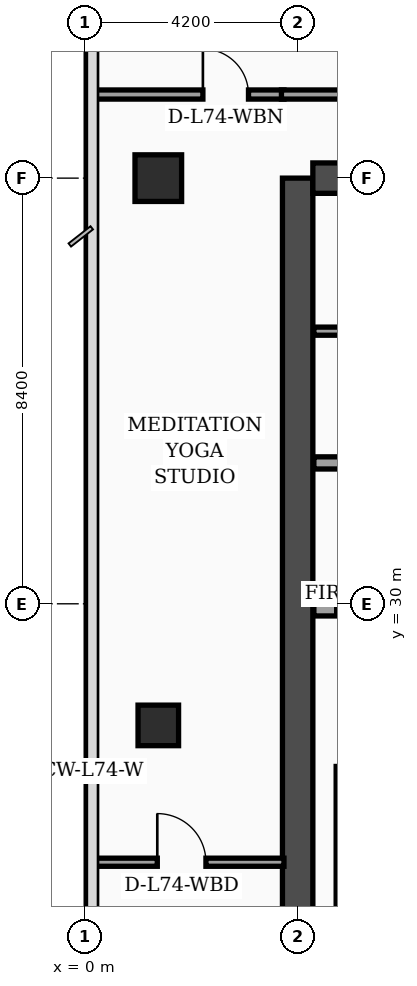
"""IFC4 building model, lengths in metres.
Left out: names, types, materials, properties, quantities, classifications, styles, units other than length and angle.
Written with IfcOpenShell. Run it as: python <this file> out.ifc"""

import sys

from ifc_helpers import new_model, si_unit, direction, frame, frame_2d, origin, origin_2d, place, context, subcontext, project, spatial, rectangle, extrude, element, fill, save


model = new_model("IFC4")
c1 = context("Model", 3, precision=1e-05, world=origin(), true_north=direction((0.0, 1.0)))
c2 = subcontext(c1, "Body", "Model", "MODEL_VIEW")
j1 = project(units=[si_unit("LENGTHUNIT", "METRE"), si_unit("PLANEANGLEUNIT", "RADIAN")], contexts=[c1])
p1 = place(None, origin())
s1 = spatial("IfcSite", under=j1, at=p1, CompositionType="ELEMENT")
p2 = place(p1, origin())
s2 = spatial("IfcBuilding", under=s1, at=p2, CompositionType="ELEMENT")
p3 = place(p2, frame((0.0, 0.0, 298.7)))
s3 = spatial("IfcBuildingStorey", under=s2, at=p3, CompositionType="ELEMENT", Elevation=298.7)
p4 = place(p3, frame((4.2, 16.8, 0.0), z_axis=(0.0, 0.0, 1.0), x_axis=(0.0, 1.0, 0.0)))
e1 = element("IfcWall", 1, at=p4, inside=s3, PredefinedType="SHEAR", context=c2, shape_type="SweptSolid", body=[
    extrude(rectangle(XDim=21.6, YDim=0.6, at=frame_2d((10.8, 0.0))), origin(), (0.0, 0.0, 1.0), 3.56),
])
p5 = place(p3, frame((4.5, 38.4, 0.0), z_axis=(0.0, 0.0, 1.0), x_axis=(1.0, 0.0, 0.0)))
e2 = element("IfcWall", 2, at=p5, inside=s3, PredefinedType="SHEAR", context=c2, shape_type="SweptSolid", body=[
    extrude(rectangle(XDim=10.2, YDim=0.6, at=frame_2d((5.1, 0.0))), origin(), (0.0, 0.0, 1.0), 3.56),
])
p6 = place(p5, frame((5.8, 0.0, 0.0)))
e3 = element("IfcOpeningElement", 3, at=p6, cuts=e2, PredefinedType="OPENING", context=c2, shape_type="SweptSolid", body=[
    extrude(rectangle(XDim=1.1, YDim=2.2, at=frame_2d((0.55, 1.1))), frame((0.0, 0.31, 0.0), z_axis=(0.0, -1.0, 0.0), x_axis=(1.0, 0.0, 0.0)), (0.0, 0.0, 1.0), 0.62),
])
p7 = place(p3, frame((5.08, 17.1, 0.0), z_axis=(0.0, 0.0, 1.0), x_axis=(0.0, 1.0, 0.0)))
e4 = element("IfcWall", 4, at=p7, inside=s3, PredefinedType="SOLIDWALL", context=c2, shape_type="SweptSolid", body=[
    extrude(rectangle(XDim=9.69, YDim=0.24, at=frame_2d((4.845, 0.0))), origin(), (0.0, 0.0, 1.0), 3.56),
])
p8 = place(p3, frame((1.45, 27.6, 0.0), z_axis=(0.0, 0.0, 1.0), x_axis=(1.0, 0.0, 0.0)))
e5 = element("IfcColumn", 5, at=p8, inside=s3, PredefinedType="COLUMN", context=c2, shape_type="SweptSolid", body=[
    extrude(rectangle(XDim=0.8, YDim=0.8, at=origin_2d()), origin(), (0.0, 0.0, 1.0), 3.56),
])
p9 = place(p3, frame((1.45, 38.4, 0.0), z_axis=(0.0, 0.0, 1.0), x_axis=(1.0, 0.0, 0.0)))
e6 = element("IfcColumn", 6, at=p9, inside=s3, PredefinedType="COLUMN", context=c2, shape_type="SweptSolid", body=[
    extrude(rectangle(XDim=0.92, YDim=0.92, at=origin_2d()), origin(), (0.0, 0.0, 1.0), 3.56),
])
p10 = place(p3, frame((4.52, 29.88, 0.0), z_axis=(0.0, 0.0, 1.0), x_axis=(1.0, 0.0, 0.0)))
e7 = element("IfcWall", 7, at=p10, inside=s3, PredefinedType="SOLIDWALL", context=c2, shape_type="SweptSolid", body=[
    extrude(rectangle(XDim=4.9, YDim=0.24, at=frame_2d((2.45, 0.0))), origin(), (0.0, 0.0, 1.0), 3.56),
])
p11 = place(p10, frame((0.45, 0.0, 0.0)))
e8 = element("IfcOpeningElement", 8, at=p11, cuts=e7, PredefinedType="OPENING", context=c2, shape_type="SweptSolid", body=[
    extrude(rectangle(XDim=1.3, YDim=2.35, at=frame_2d((0.65, 1.175))), frame((0.0, 0.13, 0.0), z_axis=(0.0, -1.0, 0.0), x_axis=(1.0, 0.0, 0.0)), (0.0, 0.0, 1.0), 0.26),
])
p12 = place(p3, frame((4.52, 32.78, 0.0), z_axis=(0.0, 0.0, 1.0), x_axis=(1.0, 0.0, 0.0)))
e9 = element("IfcWall", 9, at=p12, inside=s3, PredefinedType="SOLIDWALL", context=c2, shape_type="SweptSolid", body=[
    extrude(rectangle(XDim=4.9, YDim=0.24, at=frame_2d((2.45, 0.0))), origin(), (0.0, 0.0, 1.0), 3.19),
])
p13 = place(p3, frame((4.52, 35.38, 0.0), z_axis=(0.0, 0.0, 1.0), x_axis=(1.0, 0.0, 0.0)))
e10 = element("IfcWall", 10, at=p13, inside=s3, PredefinedType="PARTITIONING", context=c2, shape_type="SweptSolid", body=[
    extrude(rectangle(XDim=4.9, YDim=0.16, at=frame_2d((2.45, 0.0))), origin(), (0.0, 0.0, 1.0), 3.56),
])
p14 = place(p13, frame((1.3, 0.0, 0.0)))
e11 = element("IfcOpeningElement", 11, at=p14, cuts=e10, PredefinedType="OPENING", context=c2, shape_type="SweptSolid", body=[
    extrude(rectangle(XDim=0.98, YDim=2.15, at=frame_2d((0.49, 1.075))), frame((0.0, 0.09, 0.0), z_axis=(0.0, -1.0, 0.0), x_axis=(1.0, 0.0, 0.0)), (0.0, 0.0, 1.0), 0.18),
])
p15 = place(p3, frame((0.08, 24.9, 0.0), z_axis=(0.0, 0.0, 1.0), x_axis=(1.0, 0.0, 0.0)))
e12 = element("IfcWall", 12, at=p15, inside=s3, PredefinedType="PARTITIONING", context=c2, shape_type="SweptSolid", body=[
    extrude(rectangle(XDim=3.85, YDim=0.16, at=frame_2d((1.925, 0.0))), origin(), (0.0, 0.0, 1.0), 3.09),
])
p16 = place(p15, frame((1.35, 0.0, 0.0)))
e13 = element("IfcOpeningElement", 13, at=p16, cuts=e12, PredefinedType="OPENING", context=c2, shape_type="SweptSolid", body=[
    extrude(rectangle(XDim=0.96, YDim=2.2, at=frame_2d((0.48, 1.1))), frame((0.0, 0.09, 0.0), z_axis=(0.0, -1.0, 0.0), x_axis=(1.0, 0.0, 0.0)), (0.0, 0.0, 1.0), 0.18),
])
p17 = place(p3, frame((0.08, 40.05, 0.0), z_axis=(0.0, 0.0, 1.0), x_axis=(1.0, 0.0, 0.0)))
e14 = element("IfcWall", 14, at=p17, inside=s3, PredefinedType="PARTITIONING", context=c2, shape_type="SweptSolid", body=[
    extrude(rectangle(XDim=3.85, YDim=0.18, at=frame_2d((1.925, 0.0))), origin(), (0.0, 0.0, 1.0), 2.99),
])
p18 = place(p17, frame((2.25, 0.0, 0.0)))
e15 = element("IfcOpeningElement", 15, at=p18, cuts=e14, PredefinedType="OPENING", context=c2, shape_type="SweptSolid", body=[
    extrude(rectangle(XDim=0.9, YDim=2.15, at=frame_2d((0.45, 1.075))), frame((0.0, 0.1, 0.0), z_axis=(0.0, -1.0, 0.0), x_axis=(1.0, 0.0, 0.0)), (0.0, 0.0, 1.0), 0.2),
])
p19 = place(p3, frame((3.88, 40.05, 0.0), z_axis=(0.0, 0.0, 1.0), x_axis=(1.0, 0.0, 0.0)))
e16 = element("IfcWall", 16, at=p19, inside=s3, PredefinedType="PARTITIONING", context=c2, shape_type="SweptSolid", body=[
    extrude(rectangle(XDim=11.27, YDim=0.18, at=frame_2d((5.635, 0.0))), origin(), (0.0, 0.0, 1.0), 2.99),
])
p20 = place(p11, origin())
e17 = element("IfcDoor", 17, at=p20, inside=s3, OperationType="DOUBLE_DOOR_SLIDING", PredefinedType="DOOR", context=c2, shape_type="SweptSolid", body=[
    extrude(rectangle(XDim=1.3, YDim=2.35, at=frame_2d((0.65, 1.175))), frame((0.0, 0.025, 0.0), z_axis=(0.0, -1.0, 0.0), x_axis=(1.0, 0.0, 0.0)), (0.0, 0.0, 1.0), 0.05),
])
fill(e8, e17)
p21 = place(p16, origin())
e18 = element("IfcDoor", 18, at=p21, inside=s3, OperationType="SINGLE_SWING_LEFT", PredefinedType="DOOR", context=c2, shape_type="SweptSolid", body=[
    extrude(rectangle(XDim=0.96, YDim=2.2, at=frame_2d((0.48, 1.1))), frame((0.0, 0.025, 0.0), z_axis=(0.0, -1.0, 0.0), x_axis=(1.0, 0.0, 0.0)), (0.0, 0.0, 1.0), 0.05),
])
fill(e13, e18)
p22 = place(p18, origin())
e19 = element("IfcDoor", 19, at=p22, inside=s3, OperationType="SINGLE_SWING_LEFT", PredefinedType="DOOR", context=c2, shape_type="SweptSolid", body=[
    extrude(rectangle(XDim=0.9, YDim=2.15, at=frame_2d((0.45, 1.075))), frame((0.0, 0.025, 0.0), z_axis=(0.0, -1.0, 0.0), x_axis=(1.0, 0.0, 0.0)), (0.0, 0.0, 1.0), 0.05),
])
fill(e15, e19)
save(model, sys.argv[1])
